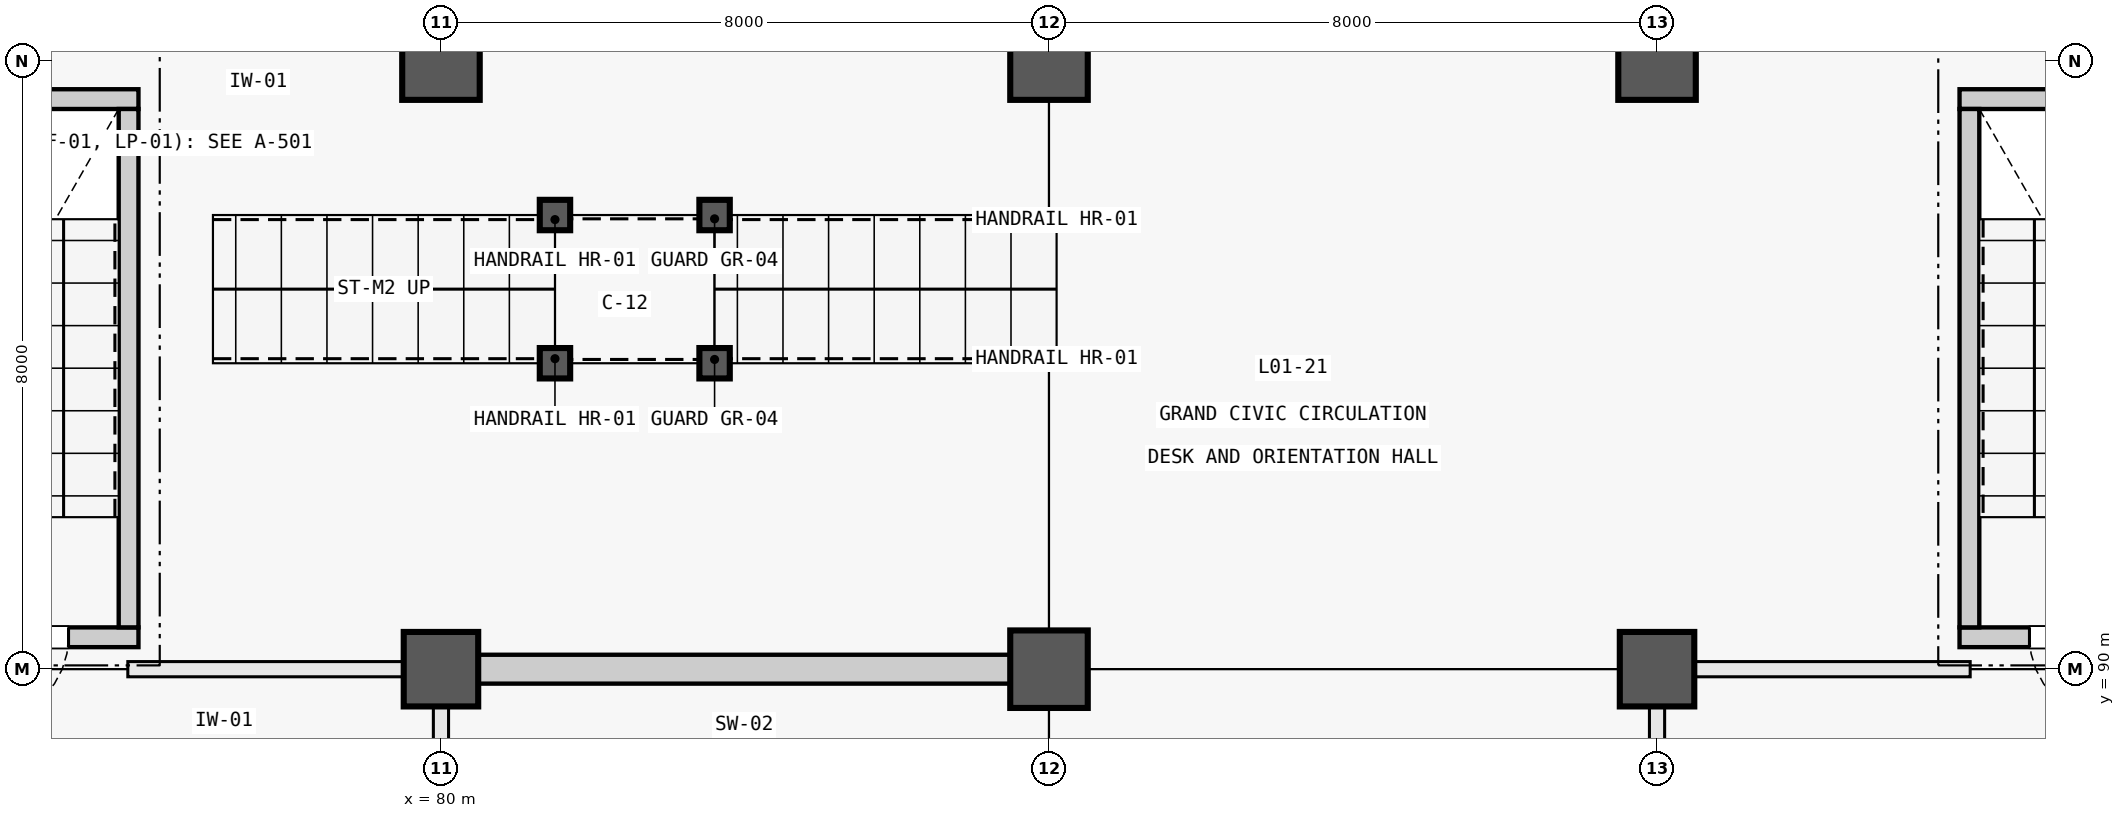
"""IFC4 building model, lengths in metres.
Left out: names, types, materials, properties, quantities, classifications, styles, units other than length and angle.
Written with IfcOpenShell. Run it as: python <this file> out.ifc"""

import sys

from ifc_helpers import new_model, si_unit, direction, frame, frame_2d, origin, origin_2d, place, context, subcontext, project, spatial, rectangle, circle, extrude, element, fill, save


model = new_model("IFC4")
c1 = context("Model", 3, precision=1e-05, world=origin(), true_north=direction((0.0, 1.0)))
c2 = subcontext(c1, "Body", "Model", "MODEL_VIEW")
j1 = project(units=[si_unit("LENGTHUNIT", "METRE"), si_unit("PLANEANGLEUNIT", "RADIAN")], contexts=[c1])
p1 = place(None, origin())
s1 = spatial("IfcSite", under=j1, at=p1, CompositionType="ELEMENT")
p2 = place(p1, origin())
s2 = spatial("IfcBuilding", under=s1, at=p2, CompositionType="ELEMENT")
p3 = place(p2, origin())
s3 = spatial("IfcBuildingStorey", under=s2, at=p3, CompositionType="ELEMENT", Elevation=0.0)
p4 = place(p3, frame((80.0, 90.0, 0.0), z_axis=(0.0, 0.0, 1.0), x_axis=(1.0, 0.0, 0.0)))
e1 = element("IfcColumn", 1, at=p4, inside=s3, PredefinedType="COLUMN", context=c2, shape_type="SweptSolid", body=[
    extrude(rectangle(XDim=0.98, YDim=0.98, at=origin_2d()), origin(), (0.0, 0.0, 1.0), 5.4),
])
for number, where, z_axis, x_axis in (
    (2, (80.0, 98.0, 0.0), (0.0, 0.0, 1.0), (1.0, 0.0, 0.0)),
    (3, (88.0, 90.0, 0.0), (0.0, 0.0, 1.0), (1.0, 0.0, 0.0)),
    (4, (88.0, 98.0, 0.0), (0.0, 0.0, 1.0), (1.0, 0.0, 0.0)),
):
    element("IfcColumn", number, at=place(p3, frame(where, z_axis=z_axis, x_axis=x_axis)), inside=s3, PredefinedType="COLUMN", context=c2, shape_type="SweptSolid", body=[
        extrude(circle(Radius=0.51, at=origin_2d()), origin(), (0.0, 0.0, 1.0), 5.4),
    ])
p5 = place(p3, frame((96.0, 90.0, 0.0), z_axis=(0.0, 0.0, 1.0), x_axis=(1.0, 0.0, 0.0)))
e5 = element("IfcColumn", 5, at=p5, inside=s3, PredefinedType="COLUMN", context=c2, shape_type="SweptSolid", body=[
    extrude(rectangle(XDim=0.98, YDim=0.98, at=origin_2d()), origin(), (0.0, 0.0, 1.0), 5.4),
])
p6 = place(p3, frame((96.0, 98.0, 0.0), z_axis=(0.0, 0.0, 1.0), x_axis=(1.0, 0.0, 0.0)))
e6 = element("IfcColumn", 6, at=p6, inside=s3, PredefinedType="COLUMN", context=c2, shape_type="SweptSolid", body=[
    extrude(circle(Radius=0.51, at=origin_2d()), origin(), (0.0, 0.0, 1.0), 5.4),
])
p7 = place(p3, frame((80.49, 90.0, 0.0), z_axis=(0.0, 0.0, 1.0), x_axis=(1.0, 0.0, 0.0)))
e7 = element("IfcWall", 7, at=p7, inside=s3, PredefinedType="SHEAR", context=c2, shape_type="SweptSolid", body=[
    extrude(rectangle(XDim=7.0, YDim=0.38, at=frame_2d((3.5, 0.0))), origin(), (0.0, 0.0, 1.0), 5.03),
])
p8 = place(p3, frame((72.44, 90.42, 0.0), z_axis=(0.0, 0.0, 1.0), x_axis=(1.0, 0.0, 0.0)))
e8 = element("IfcWall", 8, at=p8, inside=s3, PredefinedType="SOLIDWALL", context=c2, shape_type="SweptSolid", body=[
    extrude(rectangle(XDim=3.58, YDim=0.26, at=frame_2d((1.79, 0.0))), origin(), (0.0, 0.0, 1.0), 5.4),
])
p9 = place(p8, frame((1.56, 0.0, 0.0)))
e9 = element("IfcOpeningElement", 9, at=p9, cuts=e8, PredefinedType="OPENING", context=c2, shape_type="SweptSolid", body=[
    extrude(rectangle(XDim=1.1, YDim=2.2, at=frame_2d((0.55, 1.1))), frame((0.0, 0.142, 0.0), z_axis=(0.0, -1.0, 0.0), x_axis=(1.0, 0.0, 0.0)), (0.0, 0.0, 1.0), 0.284),
])
p10 = place(p3, frame((72.44, 97.5, 0.0), z_axis=(0.0, 0.0, 1.0), x_axis=(1.0, 0.0, 0.0)))
e10 = element("IfcWall", 10, at=p10, inside=s3, PredefinedType="SOLIDWALL", context=c2, shape_type="SweptSolid", body=[
    extrude(rectangle(XDim=3.58, YDim=0.26, at=frame_2d((1.79, 0.0))), origin(), (0.0, 0.0, 1.0), 5.4),
])
p11 = place(p3, frame((75.89, 90.55, 0.0), z_axis=(0.0, 0.0, 1.0), x_axis=(0.0, 1.0, 0.0)))
e11 = element("IfcWall", 11, at=p11, inside=s3, PredefinedType="SOLIDWALL", context=c2, shape_type="SweptSolid", body=[
    extrude(rectangle(XDim=6.82, YDim=0.26, at=frame_2d((3.41, 0.0))), origin(), (0.0, 0.0, 1.0), 5.4),
])
p12 = place(p3, frame((99.98, 90.42, 0.0), z_axis=(0.0, 0.0, 1.0), x_axis=(1.0, 0.0, 0.0)))
e12 = element("IfcWall", 12, at=p12, inside=s3, PredefinedType="SOLIDWALL", context=c2, shape_type="SweptSolid", body=[
    extrude(rectangle(XDim=3.58, YDim=0.26, at=frame_2d((1.79, 0.0))), origin(), (0.0, 0.0, 1.0), 5.4),
])
p13 = place(p12, frame((0.92, 0.0, 0.0)))
e13 = element("IfcOpeningElement", 13, at=p13, cuts=e12, PredefinedType="OPENING", context=c2, shape_type="SweptSolid", body=[
    extrude(rectangle(XDim=1.1, YDim=2.2, at=frame_2d((0.55, 1.1))), frame((0.0, 0.142, 0.0), z_axis=(0.0, -1.0, 0.0), x_axis=(1.0, 0.0, 0.0)), (0.0, 0.0, 1.0), 0.284),
])
p14 = place(p3, frame((99.98, 97.5, 0.0), z_axis=(0.0, 0.0, 1.0), x_axis=(1.0, 0.0, 0.0)))
e14 = element("IfcWall", 14, at=p14, inside=s3, PredefinedType="SOLIDWALL", context=c2, shape_type="SweptSolid", body=[
    extrude(rectangle(XDim=3.58, YDim=0.26, at=frame_2d((1.79, 0.0))), origin(), (0.0, 0.0, 1.0), 5.4),
])
p15 = place(p3, frame((100.11, 90.55, 0.0), z_axis=(0.0, 0.0, 1.0), x_axis=(0.0, 1.0, 0.0)))
e15 = element("IfcWall", 15, at=p15, inside=s3, PredefinedType="SOLIDWALL", context=c2, shape_type="SweptSolid", body=[
    extrude(rectangle(XDim=6.82, YDim=0.26, at=frame_2d((3.41, 0.0))), origin(), (0.0, 0.0, 1.0), 5.4),
])
for number, where, z_axis, x_axis in (
    (16, (81.5, 94.025, 0.0), (0.0, 0.0, 1.0), (1.0, 0.0, 0.0)),
    (17, (83.6, 94.025, 0.0), (0.0, 0.0, 1.0), (1.0, 0.0, 0.0)),
    (18, (83.6, 95.975, 0.0), (0.0, 0.0, 1.0), (1.0, 0.0, 0.0)),
    (19, (81.5, 95.975, 0.0), (0.0, 0.0, 1.0), (1.0, 0.0, 0.0)),
):
    element("IfcColumn", number, at=place(p3, frame(where, z_axis=z_axis, x_axis=x_axis)), inside=s3, PredefinedType="COLUMN", context=c2, shape_type="SweptSolid", body=[
        extrude(rectangle(XDim=0.4, YDim=0.4, at=origin_2d()), origin(), (0.0, 0.0, 1.0), 2.46),
    ])
p16 = place(p3, frame((80.0, 84.72, 0.0), z_axis=(0.0, 0.0, 1.0), x_axis=(0.0, 1.0, 0.0)))
e20 = element("IfcWall", 20, at=p16, inside=s3, PredefinedType="PARTITIONING", context=c2, shape_type="SweptSolid", body=[
    extrude(rectangle(XDim=4.78, YDim=0.2, at=frame_2d((2.39, 0.0))), origin(), (0.0, 0.0, 1.0), 3.88),
])
p17 = place(p16, frame((1.79, 0.0, 0.0)))
e21 = element("IfcOpeningElement", 21, at=p17, cuts=e20, PredefinedType="OPENING", context=c2, shape_type="SweptSolid", body=[
    extrude(rectangle(XDim=1.2, YDim=2.25, at=frame_2d((0.6, 1.125))), frame((0.0, 0.112, 0.0), z_axis=(0.0, -1.0, 0.0), x_axis=(1.0, 0.0, 0.0)), (0.0, 0.0, 1.0), 0.224),
])
p18 = place(p3, frame((75.88, 90.0, 0.0), z_axis=(0.0, 0.0, 1.0), x_axis=(1.0, 0.0, 0.0)))
e22 = element("IfcWall", 22, at=p18, inside=s3, PredefinedType="PARTITIONING", context=c2, shape_type="SweptSolid", body=[
    extrude(rectangle(XDim=3.62, YDim=0.2, at=frame_2d((1.81, 0.0))), origin(), (0.0, 0.0, 1.0), 3.88),
])
p19 = place(p3, frame((96.0, 84.72, 0.0), z_axis=(0.0, 0.0, 1.0), x_axis=(0.0, 1.0, 0.0)))
e23 = element("IfcWall", 23, at=p19, inside=s3, PredefinedType="PARTITIONING", context=c2, shape_type="SweptSolid", body=[
    extrude(rectangle(XDim=4.78, YDim=0.2, at=frame_2d((2.39, 0.0))), origin(), (0.0, 0.0, 1.0), 3.88),
])
p20 = place(p19, frame((1.79, 0.0, 0.0)))
e24 = element("IfcOpeningElement", 24, at=p20, cuts=e23, PredefinedType="OPENING", context=c2, shape_type="SweptSolid", body=[
    extrude(rectangle(XDim=1.2, YDim=2.25, at=frame_2d((0.6, 1.125))), frame((0.0, 0.112, 0.0), z_axis=(0.0, -1.0, 0.0), x_axis=(1.0, 0.0, 0.0)), (0.0, 0.0, 1.0), 0.224),
])
p21 = place(p3, frame((96.5, 90.0, 0.0), z_axis=(0.0, 0.0, 1.0), x_axis=(1.0, 0.0, 0.0)))
e25 = element("IfcWall", 25, at=p21, inside=s3, PredefinedType="PARTITIONING", context=c2, shape_type="SweptSolid", body=[
    extrude(rectangle(XDim=3.62, YDim=0.2, at=frame_2d((1.81, 0.0))), origin(), (0.0, 0.0, 1.0), 3.88),
])
p22 = place(p9, frame((1.1, 0.0, 0.0), z_axis=(0.0, 0.0, 1.0), x_axis=(-1.0, 0.0, 0.0)))
e26 = element("IfcDoor", 26, at=p22, inside=s3, OperationType="SINGLE_SWING_LEFT", PredefinedType="DOOR", context=c2, shape_type="SweptSolid", body=[
    extrude(rectangle(XDim=1.1, YDim=2.2, at=frame_2d((0.55, 1.1))), frame((0.0, 0.025, 0.0), z_axis=(0.0, -1.0, 0.0), x_axis=(1.0, 0.0, 0.0)), (0.0, 0.0, 1.0), 0.05),
])
fill(e9, e26)
p23 = place(p13, frame((1.1, 0.0, 0.0), z_axis=(0.0, 0.0, 1.0), x_axis=(-1.0, 0.0, 0.0)))
e27 = element("IfcDoor", 27, at=p23, inside=s3, OperationType="SINGLE_SWING_RIGHT", PredefinedType="DOOR", context=c2, shape_type="SweptSolid", body=[
    extrude(rectangle(XDim=1.1, YDim=2.2, at=frame_2d((0.55, 1.1))), frame((0.0, 0.025, 0.0), z_axis=(0.0, -1.0, 0.0), x_axis=(1.0, 0.0, 0.0)), (0.0, 0.0, 1.0), 0.05),
])
fill(e13, e27)
save(model, sys.argv[1])
